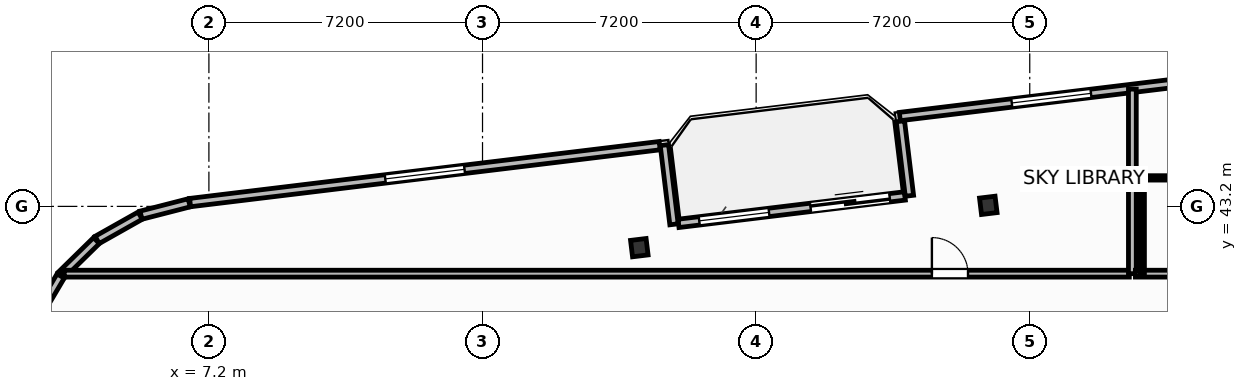
"""IFC4 building model, lengths in metres.
Left out: names, types, materials, properties, quantities, classifications, styles, units other than length and angle.
Written with IfcOpenShell. Run it as: python <this file> out.ifc"""

import sys

from ifc_helpers import new_model, si_unit, direction, frame, frame_2d, origin, origin_2d, place, context, subcontext, project, spatial, rectangle, i_section, extrude, element, fill, save


model = new_model("IFC4")
c1 = context("Model", 3, precision=1e-05, world=origin(), true_north=direction((0.0, 1.0)))
c2 = subcontext(c1, "Body", "Model", "MODEL_VIEW")
j1 = project(units=[si_unit("LENGTHUNIT", "METRE"), si_unit("PLANEANGLEUNIT", "RADIAN")], contexts=[c1])
p1 = place(None, origin())
s1 = spatial("IfcSite", under=j1, at=p1, CompositionType="ELEMENT")
p2 = place(p1, origin())
s2 = spatial("IfcBuilding", under=s1, at=p2, CompositionType="ELEMENT")
p3 = place(p2, frame((0.0, 0.0, 185.7)))
s3 = spatial("IfcBuildingStorey", under=s2, at=p3, CompositionType="ELEMENT", Elevation=185.7)
for number, where, z_axis, x_axis in (
    (1, (27.709, 43.227, 0.0), (0.0, 0.0, 1.0), (0.993, 0.12, 0.0)),
    (2, (18.526, 42.114, 0.0), (0.0, 0.0, 1.0), (0.993, 0.12, 0.0)),
):
    element("IfcColumn", number, at=place(p3, frame(where, z_axis=z_axis, x_axis=x_axis)), inside=s3, PredefinedType="COLUMN", context=c2, shape_type="SweptSolid", body=[
        extrude(i_section(OverallWidth=0.412, OverallDepth=0.435, WebThickness=0.036, FlangeThickness=0.057, FilletRadius=0.025, at=origin_2d()), origin(), (0.0, 0.0, 1.0), 3.7),
    ])
p4 = place(p3, frame((19.557, 42.753, 0.0), z_axis=(0.0, 0.0, 1.0), x_axis=(0.992729951822, 0.120362962556, 0.0)))
e3 = element("IfcWall", 3, at=p4, inside=s3, PredefinedType="SOLIDWALL", context=c2, shape_type="SweptSolid", body=[
    extrude(rectangle(XDim=6.0, YDim=0.22, at=frame_2d((3.0, 0.0))), origin(), (0.0, 0.0, 1.0), 2.73),
])
p5 = place(p4, frame((3.5, 0.0, 0.0)))
e4 = element("IfcOpeningElement", 4, at=p5, cuts=e3, PredefinedType="OPENING", context=c2, shape_type="SweptSolid", body=[
    extrude(rectangle(XDim=2.1, YDim=2.3, at=frame_2d((1.05, 1.15))), frame((0.0, 0.12, 0.0), z_axis=(0.0, -1.0, 0.0), x_axis=(1.0, 0.0, 0.0)), (0.0, 0.0, 1.0), 0.24),
])
p6 = place(p4, frame((0.55, 0.0, 0.75)))
e5 = element("IfcOpeningElement", 5, at=p6, cuts=e3, PredefinedType="OPENING", context=c2, shape_type="SweptSolid", body=[
    extrude(rectangle(XDim=1.85, YDim=1.75, at=frame_2d((0.925, 0.875))), frame((0.0, 0.12, 0.0), z_axis=(0.0, -1.0, 0.0), x_axis=(1.0, 0.0, 0.0)), (0.0, 0.0, 1.0), 0.24),
])
p7 = place(p3, frame((33.357, 46.531, 0.0), z_axis=(0.0, 0.0, 1.0), x_axis=(-0.992731032022, -0.120354052946, 0.0)))
e6 = element("IfcWall", 6, at=p7, inside=s3, PredefinedType="SOLIDWALL", context=c2, shape_type="SweptSolid", body=[
    extrude(rectangle(XDim=8.035, YDim=0.22, at=frame_2d((4.018, 0.0))), origin(), (0.0, 0.0, 1.0), 2.73),
])
p8 = place(p7, frame((2.968, 0.0, 0.8)))
e7 = element("IfcOpeningElement", 7, at=p8, cuts=e6, PredefinedType="OPENING", context=c2, shape_type="SweptSolid", body=[
    extrude(rectangle(XDim=2.1, YDim=1.75, at=frame_2d((1.05, 0.875))), frame((0.0, 0.12, 0.0), z_axis=(0.0, -1.0, 0.0), x_axis=(1.0, 0.0, 0.0)), (0.0, 0.0, 1.0), 0.24),
])
p9 = place(p3, frame((25.396, 45.44, 0.0), z_axis=(0.0, 0.0, 1.0), x_axis=(0.120275992932, -0.992740492538, 0.0)))
e8 = element("IfcWall", 8, at=p9, inside=s3, PredefinedType="SOLIDWALL", context=c2, shape_type="SweptSolid", body=[
    extrude(rectangle(XDim=1.975, YDim=0.22, at=frame_2d((0.988, 0.0))), origin(), (0.0, 0.0, 1.0), 2.73),
])
p10 = place(p3, frame((19.439, 42.729, 0.0), z_axis=(0.0, 0.0, 1.0), x_axis=(-0.120327895535, 0.992734202874, 0.0)))
e9 = element("IfcWall", 9, at=p10, inside=s3, PredefinedType="SOLIDWALL", context=c2, shape_type="SweptSolid", body=[
    extrude(rectangle(XDim=2.1, YDim=0.22, at=frame_2d((1.05, 0.0))), origin(), (0.0, 0.0, 1.0), 2.73),
])
p11 = place(p3, frame((19.062, 44.798, 0.0), z_axis=(0.0, 0.0, 1.0), x_axis=(-0.992733569027, -0.120333124809, 0.0)))
e10 = element("IfcWall", 10, at=p11, inside=s3, PredefinedType="SOLIDWALL", context=c2, shape_type="SweptSolid", body=[
    extrude(rectangle(XDim=12.447, YDim=0.22, at=frame_2d((6.224, 0.0))), origin(), (0.0, 0.0, 1.0), 2.73),
])
p12 = place(p11, frame((5.174, 0.0, 0.8)))
e11 = element("IfcOpeningElement", 11, at=p12, cuts=e10, PredefinedType="OPENING", context=c2, shape_type="SweptSolid", body=[
    extrude(rectangle(XDim=2.1, YDim=1.75, at=frame_2d((1.05, 0.875))), frame((0.0, 0.12, 0.0), z_axis=(0.0, -1.0, 0.0), x_axis=(1.0, 0.0, 0.0)), (0.0, 0.0, 1.0), 0.24),
])
p13 = place(p3, frame((6.681, 43.294, 0.0), z_axis=(0.0, 0.0, 1.0), x_axis=(-0.968496788899, -0.2490260426, 0.0)))
e12 = element("IfcWall", 12, at=p13, inside=s3, PredefinedType="SOLIDWALL", context=c2, shape_type="SweptSolid", body=[
    extrude(rectangle(XDim=1.309, YDim=0.22, at=frame_2d((0.654, 0.0))), origin(), (0.0, 0.0, 1.0), 2.73),
])
for number, where, z_axis, x_axis in (
    (13, (5.392, 42.956, 0.0), (0.0, 0.0, 1.0), (-0.871, -0.491, 0.0)),
    (14, (4.241, 42.3, 0.0), (0.0, 0.0, 1.0), (-0.714, -0.7, 0.0)),
):
    element("IfcWall", number, at=place(p3, frame(where, z_axis=z_axis, x_axis=x_axis)), inside=s3, PredefinedType="SOLIDWALL", context=c2, shape_type="SweptSolid", body=[
        extrude(rectangle(XDim=1.301, YDim=0.22, at=frame_2d((0.65, 0.0))), origin(), (0.0, 0.0, 1.0), 2.73),
    ])
p14 = place(p3, frame((3.299, 41.368, 0.0), z_axis=(0.0, 0.0, 1.0), x_axis=(-0.508716668029, -0.860933999601, 0.0)))
e15 = element("IfcWall", 15, at=p14, inside=s3, PredefinedType="SOLIDWALL", context=c2, shape_type="SweptSolid", body=[
    extrude(rectangle(XDim=1.301, YDim=0.22, at=frame_2d((0.65, 0.0))), origin(), (0.0, 0.0, 1.0), 2.73),
])
p15 = place(p3, frame((3.393, 41.43, 0.0), z_axis=(0.0, 0.0, 1.0), x_axis=(1.0, 0.0, 0.0)))
e16 = element("IfcWall", 16, at=p15, inside=s3, PredefinedType="PARTITIONING", context=c2, shape_type="SweptSolid", body=[
    extrude(rectangle(XDim=28.027, YDim=0.18, at=frame_2d((14.013, 0.0))), origin(), (0.0, 0.0, 1.0), 2.662),
])
p16 = place(p15, frame((22.832, 0.0, 0.0)))
e17 = element("IfcOpeningElement", 17, at=p16, cuts=e16, PredefinedType="OPENING", context=c2, shape_type="SweptSolid", body=[
    extrude(rectangle(XDim=0.95, YDim=2.05, at=frame_2d((0.475, 1.025))), frame((0.0, 0.1, 0.0), z_axis=(0.0, -1.0, 0.0), x_axis=(1.0, 0.0, 0.0)), (0.0, 0.0, 1.0), 0.2),
])
p17 = place(p3, frame((31.5, 41.43, 0.0), z_axis=(0.0, 0.0, 1.0), x_axis=(0.0, 1.0, 0.0)))
e18 = element("IfcWall", 18, at=p17, inside=s3, PredefinedType="PARTITIONING", context=c2, shape_type="SweptSolid", body=[
    extrude(rectangle(XDim=4.856, YDim=0.205, at=frame_2d((2.428, 0.0))), origin(), (0.0, 0.0, 1.0), 3.45),
])
p18 = place(p3, frame((31.58, 41.43, 0.0), z_axis=(0.0, 0.0, 1.0), x_axis=(1.0, 0.0, 0.0)))
e19 = element("IfcWall", 19, at=p18, inside=s3, PredefinedType="PARTITIONING", context=c2, shape_type="SweptSolid", body=[
    extrude(rectangle(XDim=8.84, YDim=0.18, at=frame_2d((4.42, 0.0))), origin(), (0.0, 0.0, 1.0), 3.45),
])
p19 = place(p18, frame((3.308, 0.0, 0.0)))
e20 = element("IfcOpeningElement", 20, at=p19, cuts=e19, PredefinedType="OPENING", context=c2, shape_type="SweptSolid", body=[
    extrude(rectangle(XDim=0.95, YDim=2.15, at=frame_2d((0.475, 1.075))), frame((0.0, 0.1, 0.0), z_axis=(0.0, -1.0, 0.0), x_axis=(1.0, 0.0, 0.0)), (0.0, 0.0, 1.0), 0.2),
])
p20 = place(p3, frame((31.8, 43.95, 0.0), z_axis=(0.0, 0.0, 1.0), x_axis=(1.0, 0.0, 0.0)))
e21 = element("IfcWall", 21, at=p20, inside=s3, PredefinedType="PARTITIONING", context=c2, shape_type="SweptSolid", body=[
    extrude(rectangle(XDim=2.15, YDim=0.115, at=frame_2d((1.075, 0.0))), origin(), (0.0, 0.0, 1.0), 2.824),
])
p21 = place(p3, frame((31.76, 41.43, 0.0), z_axis=(0.0, 0.0, 1.0), x_axis=(0.0, 1.0, 0.0)))
e22 = element("IfcWall", 22, at=p21, inside=s3, PredefinedType="PARTITIONING", context=c2, shape_type="SweptSolid", body=[
    extrude(rectangle(XDim=2.52, YDim=0.115, at=frame_2d((1.26, 0.0))), origin(), (0.0, 0.0, 1.0), 3.45),
])
p22 = place(p5, origin())
e23 = element("IfcDoor", 23, at=p22, inside=s3, OperationType="SLIDING_TO_LEFT", PredefinedType="DOOR", context=c2, shape_type="SweptSolid", body=[
    extrude(rectangle(XDim=2.1, YDim=2.3, at=frame_2d((1.05, 1.15))), frame((0.0, 0.025, 0.0), z_axis=(0.0, -1.0, 0.0), x_axis=(1.0, 0.0, 0.0)), (0.0, 0.0, 1.0), 0.05),
])
fill(e4, e23)
p23 = place(p6, origin())
e24 = element("IfcWindow", 24, at=p23, inside=s3, PartitioningType="SINGLE_PANEL", PredefinedType="WINDOW", context=c2, shape_type="SweptSolid", body=[
    extrude(rectangle(XDim=1.85, YDim=1.75, at=frame_2d((0.925, 0.875))), frame((0.0, 0.03, 0.0), z_axis=(0.0, -1.0, 0.0), x_axis=(1.0, 0.0, 0.0)), (0.0, 0.0, 1.0), 0.06),
])
fill(e5, e24)
p24 = place(p8, origin())
e25 = element("IfcWindow", 25, at=p24, inside=s3, PartitioningType="SINGLE_PANEL", PredefinedType="WINDOW", context=c2, shape_type="SweptSolid", body=[
    extrude(rectangle(XDim=2.1, YDim=1.75, at=frame_2d((1.05, 0.875))), frame((0.0, 0.03, 0.0), z_axis=(0.0, -1.0, 0.0), x_axis=(1.0, 0.0, 0.0)), (0.0, 0.0, 1.0), 0.06),
])
fill(e7, e25)
p25 = place(p12, origin())
e26 = element("IfcWindow", 26, at=p25, inside=s3, PartitioningType="SINGLE_PANEL", PredefinedType="WINDOW", context=c2, shape_type="SweptSolid", body=[
    extrude(rectangle(XDim=2.1, YDim=1.75, at=frame_2d((1.05, 0.875))), frame((0.0, 0.03, 0.0), z_axis=(0.0, -1.0, 0.0), x_axis=(1.0, 0.0, 0.0)), (0.0, 0.0, 1.0), 0.06),
])
fill(e11, e26)
p26 = place(p16, origin())
e27 = element("IfcDoor", 27, at=p26, inside=s3, OperationType="SINGLE_SWING_LEFT", PredefinedType="DOOR", context=c2, shape_type="SweptSolid", body=[
    extrude(rectangle(XDim=0.95, YDim=2.05, at=frame_2d((0.475, 1.025))), frame((0.0, 0.025, 0.0), z_axis=(0.0, -1.0, 0.0), x_axis=(1.0, 0.0, 0.0)), (0.0, 0.0, 1.0), 0.05),
])
fill(e17, e27)
save(model, sys.argv[1])
